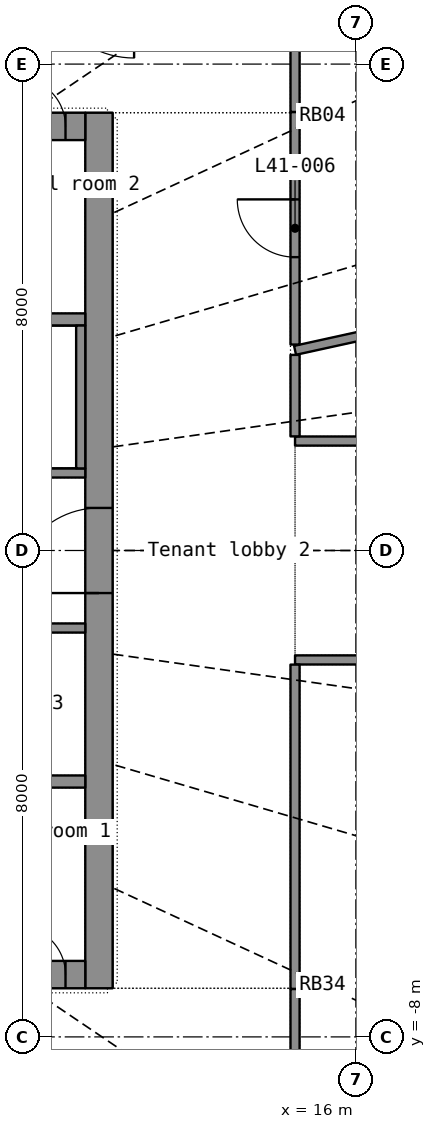
"""IFC4 building model, lengths in metres.
Left out: names, types, materials, properties, quantities, classifications, styles, units other than length and angle.
Written with IfcOpenShell. Run it as: python <this file> out.ifc"""

import sys

from ifc_helpers import new_model, si_unit, direction, frame, frame_2d, origin, place, context, subcontext, project, spatial, rectangle, extrude, element, fill, save


model = new_model("IFC4")
c1 = context("Model", 3, precision=1e-05, world=origin(), true_north=direction((0.0, 1.0)))
c2 = subcontext(c1, "Body", "Model", "MODEL_VIEW")
j1 = project(units=[si_unit("LENGTHUNIT", "METRE"), si_unit("PLANEANGLEUNIT", "RADIAN")], contexts=[c1])
p1 = place(None, origin())
s1 = spatial("IfcSite", under=j1, at=p1, CompositionType="ELEMENT")
p2 = place(p1, origin())
s2 = spatial("IfcBuilding", under=s1, at=p2, CompositionType="ELEMENT")
p3 = place(p2, frame((0.0, 0.0, 171.9)))
s3 = spatial("IfcBuildingStorey", under=s2, at=p3, CompositionType="ELEMENT", Elevation=171.9)
p4 = place(p3, frame((11.775, -7.2, 0.0), z_axis=(0.0, 0.0, 1.0), x_axis=(0.0, 1.0, 0.0)))
e1 = element("IfcWall", 1, at=p4, inside=s3, PredefinedType="SHEAR", context=c2, shape_type="SweptSolid", body=[
    extrude(rectangle(XDim=14.4, YDim=0.45, at=frame_2d((7.2, 0.0))), origin(), (0.0, 0.0, 1.0), 3.3),
])
p5 = place(p4, frame((6.5, 0.0, 0.0)))
e2 = element("IfcOpeningElement", 2, at=p5, cuts=e1, PredefinedType="OPENING", context=c2, shape_type="SweptSolid", body=[
    extrude(rectangle(XDim=1.4, YDim=2.2, at=frame_2d((0.7, 1.1))), frame((0.0, 0.235, 0.0), z_axis=(0.0, -1.0, 0.0), x_axis=(1.0, 0.0, 0.0)), (0.0, 0.0, 1.0), 0.47),
])
p6 = place(p3, frame((-11.55, -6.975, 0.0), z_axis=(0.0, 0.0, 1.0), x_axis=(1.0, 0.0, 0.0)))
e3 = element("IfcWall", 3, at=p6, inside=s3, PredefinedType="SHEAR", context=c2, shape_type="SweptSolid", body=[
    extrude(rectangle(XDim=23.1, YDim=0.45, at=frame_2d((11.55, 0.0))), origin(), (0.0, 0.0, 1.0), 3.3),
])
p7 = place(p6, frame((20.0, 0.0, 0.0)))
e4 = element("IfcOpeningElement", 4, at=p7, cuts=e3, PredefinedType="OPENING", context=c2, shape_type="SweptSolid", body=[
    extrude(rectangle(XDim=1.1, YDim=2.2, at=frame_2d((0.55, 1.1))), frame((0.0, 0.235, 0.0), z_axis=(0.0, -1.0, 0.0), x_axis=(1.0, 0.0, 0.0)), (0.0, 0.0, 1.0), 0.47),
])
p8 = place(p6, frame((4.1, 0.0, 0.0)))
e5 = element("IfcOpeningElement", 5, at=p8, cuts=e3, PredefinedType="OPENING", context=c2, shape_type="SweptSolid", body=[
    extrude(rectangle(XDim=0.9, YDim=2.1, at=frame_2d((0.45, 1.05))), frame((0.0, 0.235, 0.0), z_axis=(0.0, -1.0, 0.0), x_axis=(1.0, 0.0, 0.0)), (0.0, 0.0, 1.0), 0.47),
])
p9 = place(p6, frame((11.1, 0.0, 0.0)))
e6 = element("IfcOpeningElement", 6, at=p9, cuts=e3, PredefinedType="OPENING", context=c2, shape_type="SweptSolid", body=[
    extrude(rectangle(XDim=0.9, YDim=2.1, at=frame_2d((0.45, 1.05))), frame((0.0, 0.235, 0.0), z_axis=(0.0, -1.0, 0.0), x_axis=(1.0, 0.0, 0.0)), (0.0, 0.0, 1.0), 0.47),
])
p10 = place(p6, frame((17.1, 0.0, 0.0)))
e7 = element("IfcOpeningElement", 7, at=p10, cuts=e3, PredefinedType="OPENING", context=c2, shape_type="SweptSolid", body=[
    extrude(rectangle(XDim=0.9, YDim=2.1, at=frame_2d((0.45, 1.05))), frame((0.0, 0.235, 0.0), z_axis=(0.0, -1.0, 0.0), x_axis=(1.0, 0.0, 0.0)), (0.0, 0.0, 1.0), 0.47),
])
p11 = place(p6, frame((0.325, 0.0, 0.0)))
e8 = element("IfcOpeningElement", 8, at=p11, cuts=e3, PredefinedType="OPENING", context=c2, shape_type="SweptSolid", body=[
    extrude(rectangle(XDim=0.8, YDim=2.05, at=frame_2d((0.4, 1.025))), frame((0.0, 0.235, 0.0), z_axis=(0.0, -1.0, 0.0), x_axis=(1.0, 0.0, 0.0)), (0.0, 0.0, 1.0), 0.47),
])
p12 = place(p6, frame((21.975, 0.0, 0.0)))
e9 = element("IfcOpeningElement", 9, at=p12, cuts=e3, PredefinedType="OPENING", context=c2, shape_type="SweptSolid", body=[
    extrude(rectangle(XDim=0.8, YDim=2.05, at=frame_2d((0.4, 1.025))), frame((0.0, 0.235, 0.0), z_axis=(0.0, -1.0, 0.0), x_axis=(1.0, 0.0, 0.0)), (0.0, 0.0, 1.0), 0.47),
])
p13 = place(p3, frame((-11.55, 6.975, 0.0), z_axis=(0.0, 0.0, 1.0), x_axis=(1.0, 0.0, 0.0)))
e10 = element("IfcWall", 10, at=p13, inside=s3, PredefinedType="SHEAR", context=c2, shape_type="SweptSolid", body=[
    extrude(rectangle(XDim=23.1, YDim=0.45, at=frame_2d((11.55, 0.0))), origin(), (0.0, 0.0, 1.0), 3.3),
])
p14 = place(p13, frame((2.0, 0.0, 0.0)))
e11 = element("IfcOpeningElement", 11, at=p14, cuts=e10, PredefinedType="OPENING", context=c2, shape_type="SweptSolid", body=[
    extrude(rectangle(XDim=1.1, YDim=2.2, at=frame_2d((0.55, 1.1))), frame((0.0, 0.235, 0.0), z_axis=(0.0, -1.0, 0.0), x_axis=(1.0, 0.0, 0.0)), (0.0, 0.0, 1.0), 0.47),
])
p15 = place(p13, frame((6.0, 0.0, 0.0)))
e12 = element("IfcOpeningElement", 12, at=p15, cuts=e10, PredefinedType="OPENING", context=c2, shape_type="SweptSolid", body=[
    extrude(rectangle(XDim=1.1, YDim=2.2, at=frame_2d((0.55, 1.1))), frame((0.0, 0.235, 0.0), z_axis=(0.0, -1.0, 0.0), x_axis=(1.0, 0.0, 0.0)), (0.0, 0.0, 1.0), 0.47),
])
p16 = place(p13, frame((8.0, 0.0, 0.0)))
e13 = element("IfcOpeningElement", 13, at=p16, cuts=e10, PredefinedType="OPENING", context=c2, shape_type="SweptSolid", body=[
    extrude(rectangle(XDim=1.1, YDim=2.2, at=frame_2d((0.55, 1.1))), frame((0.0, 0.235, 0.0), z_axis=(0.0, -1.0, 0.0), x_axis=(1.0, 0.0, 0.0)), (0.0, 0.0, 1.0), 0.47),
])
p17 = place(p13, frame((10.0, 0.0, 0.0)))
e14 = element("IfcOpeningElement", 14, at=p17, cuts=e10, PredefinedType="OPENING", context=c2, shape_type="SweptSolid", body=[
    extrude(rectangle(XDim=1.1, YDim=2.2, at=frame_2d((0.55, 1.1))), frame((0.0, 0.235, 0.0), z_axis=(0.0, -1.0, 0.0), x_axis=(1.0, 0.0, 0.0)), (0.0, 0.0, 1.0), 0.47),
])
p18 = place(p13, frame((12.0, 0.0, 0.0)))
e15 = element("IfcOpeningElement", 15, at=p18, cuts=e10, PredefinedType="OPENING", context=c2, shape_type="SweptSolid", body=[
    extrude(rectangle(XDim=1.1, YDim=2.2, at=frame_2d((0.55, 1.1))), frame((0.0, 0.235, 0.0), z_axis=(0.0, -1.0, 0.0), x_axis=(1.0, 0.0, 0.0)), (0.0, 0.0, 1.0), 0.47),
])
p19 = place(p13, frame((14.0, 0.0, 0.0)))
e16 = element("IfcOpeningElement", 16, at=p19, cuts=e10, PredefinedType="OPENING", context=c2, shape_type="SweptSolid", body=[
    extrude(rectangle(XDim=1.1, YDim=2.2, at=frame_2d((0.55, 1.1))), frame((0.0, 0.235, 0.0), z_axis=(0.0, -1.0, 0.0), x_axis=(1.0, 0.0, 0.0)), (0.0, 0.0, 1.0), 0.47),
])
p20 = place(p13, frame((16.0, 0.0, 0.0)))
e17 = element("IfcOpeningElement", 17, at=p20, cuts=e10, PredefinedType="OPENING", context=c2, shape_type="SweptSolid", body=[
    extrude(rectangle(XDim=1.1, YDim=2.2, at=frame_2d((0.55, 1.1))), frame((0.0, 0.235, 0.0), z_axis=(0.0, -1.0, 0.0), x_axis=(1.0, 0.0, 0.0)), (0.0, 0.0, 1.0), 0.47),
])
p21 = place(p13, frame((18.0, 0.0, 0.0)))
e18 = element("IfcOpeningElement", 18, at=p21, cuts=e10, PredefinedType="OPENING", context=c2, shape_type="SweptSolid", body=[
    extrude(rectangle(XDim=1.1, YDim=2.2, at=frame_2d((0.55, 1.1))), frame((0.0, 0.235, 0.0), z_axis=(0.0, -1.0, 0.0), x_axis=(1.0, 0.0, 0.0)), (0.0, 0.0, 1.0), 0.47),
])
p22 = place(p13, frame((20.0, 0.0, 0.0)))
e19 = element("IfcOpeningElement", 19, at=p22, cuts=e10, PredefinedType="OPENING", context=c2, shape_type="SweptSolid", body=[
    extrude(rectangle(XDim=1.1, YDim=2.2, at=frame_2d((0.55, 1.1))), frame((0.0, 0.235, 0.0), z_axis=(0.0, -1.0, 0.0), x_axis=(1.0, 0.0, 0.0)), (0.0, 0.0, 1.0), 0.47),
])
p23 = place(p13, frame((4.1, 0.0, 0.0)))
e20 = element("IfcOpeningElement", 20, at=p23, cuts=e10, PredefinedType="OPENING", context=c2, shape_type="SweptSolid", body=[
    extrude(rectangle(XDim=0.9, YDim=2.1, at=frame_2d((0.45, 1.05))), frame((0.0, 0.235, 0.0), z_axis=(0.0, -1.0, 0.0), x_axis=(1.0, 0.0, 0.0)), (0.0, 0.0, 1.0), 0.47),
])
p24 = place(p13, frame((0.325, 0.0, 0.0)))
e21 = element("IfcOpeningElement", 21, at=p24, cuts=e10, PredefinedType="OPENING", context=c2, shape_type="SweptSolid", body=[
    extrude(rectangle(XDim=0.8, YDim=2.05, at=frame_2d((0.4, 1.025))), frame((0.0, 0.235, 0.0), z_axis=(0.0, -1.0, 0.0), x_axis=(1.0, 0.0, 0.0)), (0.0, 0.0, 1.0), 0.47),
])
p25 = place(p13, frame((21.975, 0.0, 0.0)))
e22 = element("IfcOpeningElement", 22, at=p25, cuts=e10, PredefinedType="OPENING", context=c2, shape_type="SweptSolid", body=[
    extrude(rectangle(XDim=0.8, YDim=2.05, at=frame_2d((0.4, 1.025))), frame((0.0, 0.235, 0.0), z_axis=(0.0, -1.0, 0.0), x_axis=(1.0, 0.0, 0.0)), (0.0, 0.0, 1.0), 0.47),
])
for number, where, z_axis, x_axis in (
    (23, (-11.55, -3.8, 0.0), (0.0, 0.0, 1.0), (1.0, 0.0, 0.0)),
    (24, (-11.55, 3.8, 0.0), (0.0, 0.0, 1.0), (1.0, 0.0, 0.0)),
):
    element("IfcWall", number, at=place(p3, frame(where, z_axis=z_axis, x_axis=x_axis)), inside=s3, PredefinedType="SHEAR", context=c2, shape_type="SweptSolid", body=[
        extrude(rectangle(XDim=23.1, YDim=0.2, at=frame_2d((11.55, 0.0))), origin(), (0.0, 0.0, 1.0), 3.3),
    ])
p26 = place(p3, frame((3.0, -1.275, 0.0), z_axis=(0.0, 0.0, 1.0), x_axis=(1.0, 0.0, 0.0)))
e25 = element("IfcWall", 25, at=p26, inside=s3, PredefinedType="PARTITIONING", context=c2, shape_type="SweptSolid", body=[
    extrude(rectangle(XDim=8.55, YDim=0.15, at=frame_2d((4.275, 0.0))), origin(), (0.0, 0.0, 1.0), 3.3),
])
p27 = place(p26, frame((0.812, 0.0, 0.0)))
e26 = element("IfcOpeningElement", 26, at=p27, cuts=e25, PredefinedType="OPENING", context=c2, shape_type="SweptSolid", body=[
    extrude(rectangle(XDim=0.85, YDim=2.1, at=frame_2d((0.425, 1.05))), frame((0.0, 0.085, 0.0), z_axis=(0.0, -1.0, 0.0), x_axis=(1.0, 0.0, 0.0)), (0.0, 0.0, 1.0), 0.17),
])
p28 = place(p26, frame((3.083, 0.0, 0.0)))
e27 = element("IfcOpeningElement", 27, at=p28, cuts=e25, PredefinedType="OPENING", context=c2, shape_type="SweptSolid", body=[
    extrude(rectangle(XDim=0.9, YDim=2.1, at=frame_2d((0.45, 1.05))), frame((0.0, 0.085, 0.0), z_axis=(0.0, -1.0, 0.0), x_axis=(1.0, 0.0, 0.0)), (0.0, 0.0, 1.0), 0.17),
])
p29 = place(p26, frame((6.12, 0.0, 0.0)))
e28 = element("IfcOpeningElement", 28, at=p29, cuts=e25, PredefinedType="OPENING", context=c2, shape_type="SweptSolid", body=[
    extrude(rectangle(XDim=0.9, YDim=2.1, at=frame_2d((0.45, 1.05))), frame((0.0, 0.085, 0.0), z_axis=(0.0, -1.0, 0.0), x_axis=(1.0, 0.0, 0.0)), (0.0, 0.0, 1.0), 0.17),
])
p30 = place(p3, frame((3.0, 1.275, 0.0), z_axis=(0.0, 0.0, 1.0), x_axis=(1.0, 0.0, 0.0)))
e29 = element("IfcWall", 29, at=p30, inside=s3, PredefinedType="SHEAR", context=c2, shape_type="SweptSolid", body=[
    extrude(rectangle(XDim=8.55, YDim=0.15, at=frame_2d((4.275, 0.0))), origin(), (0.0, 0.0, 1.0), 3.3),
])
p31 = place(p30, frame((2.05, 0.0, 0.0)))
e30 = element("IfcOpeningElement", 30, at=p31, cuts=e29, PredefinedType="OPENING", context=c2, shape_type="SweptSolid", body=[
    extrude(rectangle(XDim=1.1, YDim=2.15, at=frame_2d((0.55, 1.075))), frame((0.0, 0.085, 0.0), z_axis=(0.0, -1.0, 0.0), x_axis=(1.0, 0.0, 0.0)), (0.0, 0.0, 1.0), 0.17),
])
p32 = place(p30, frame((0.45, 0.0, 0.0)))
e31 = element("IfcOpeningElement", 31, at=p32, cuts=e29, PredefinedType="OPENING", context=c2, shape_type="SweptSolid", body=[
    extrude(rectangle(XDim=0.9, YDim=2.1, at=frame_2d((0.45, 1.05))), frame((0.0, 0.085, 0.0), z_axis=(0.0, -1.0, 0.0), x_axis=(1.0, 0.0, 0.0)), (0.0, 0.0, 1.0), 0.17),
])
p33 = place(p3, frame((11.475, 1.35, 0.0), z_axis=(0.0, 0.0, 1.0), x_axis=(0.0, 1.0, 0.0)))
e32 = element("IfcWall", 32, at=p33, inside=s3, PredefinedType="SHEAR", context=c2, shape_type="SweptSolid", body=[
    extrude(rectangle(XDim=2.35, YDim=0.15, at=frame_2d((1.175, 0.0))), origin(), (0.0, 0.0, 1.0), 3.3),
])
p34 = place(p3, frame((22.608, 4.962, 0.0), z_axis=(0.0, 0.0, 1.0), x_axis=(-0.976750106, -0.21438104, 0.0)))
e33 = element("IfcWall", 33, at=p34, inside=s3, PredefinedType="PARTITIONING", context=c2, shape_type="SweptSolid", body=[
    extrude(rectangle(XDim=7.79, YDim=0.15, at=frame_2d((3.895, 0.0))), origin(), (0.0, 0.0, 1.0), 2.4),
])
p35 = place(p3, frame((15.0, -1.8, 0.0), z_axis=(0.0, 0.0, 1.0), x_axis=(1.0, 0.0, 0.0)))
e34 = element("IfcWall", 34, at=p35, inside=s3, PredefinedType="PARTITIONING", context=c2, shape_type="SweptSolid", body=[
    extrude(rectangle(XDim=5.766, YDim=0.15, at=frame_2d((2.883, 0.0))), origin(), (0.0, 0.0, 1.0), 2.4),
])
p36 = place(p35, frame((2.283, 0.0, 0.0)))
e35 = element("IfcOpeningElement", 35, at=p36, cuts=e34, PredefinedType="OPENING", context=c2, shape_type="SweptSolid", body=[
    extrude(rectangle(XDim=1.2, YDim=2.2, at=frame_2d((0.6, 1.1))), frame((0.0, 0.085, 0.0), z_axis=(0.0, -1.0, 0.0), x_axis=(1.0, 0.0, 0.0)), (0.0, 0.0, 1.0), 0.17),
])
p37 = place(p3, frame((20.766, 1.8, 0.0), z_axis=(0.0, 0.0, 1.0), x_axis=(-1.0, 0.0, 0.0)))
e36 = element("IfcWall", 36, at=p37, inside=s3, PredefinedType="PARTITIONING", context=c2, shape_type="SweptSolid", body=[
    extrude(rectangle(XDim=5.766, YDim=0.15, at=frame_2d((2.883, 0.0))), origin(), (0.0, 0.0, 1.0), 2.4),
])
p38 = place(p37, frame((2.283, 0.0, 0.0)))
e37 = element("IfcOpeningElement", 37, at=p38, cuts=e36, PredefinedType="OPENING", context=c2, shape_type="SweptSolid", body=[
    extrude(rectangle(XDim=1.2, YDim=2.2, at=frame_2d((0.6, 1.1))), frame((0.0, 0.085, 0.0), z_axis=(0.0, -1.0, 0.0), x_axis=(1.0, 0.0, 0.0)), (0.0, 0.0, 1.0), 0.17),
])
p39 = place(p3, frame((15.0, -7.212, 0.0), z_axis=(0.0, 0.0, 1.0), x_axis=(0.0, 1.0, 0.0)))
e38 = element("IfcWall", 38, at=p39, inside=s3, PredefinedType="PARTITIONING", context=c2, shape_type="SweptSolid", body=[
    extrude(rectangle(XDim=5.335, YDim=0.15, at=frame_2d((2.667, 0.0))), origin(), (0.0, 0.0, 1.0), 2.4),
])
p40 = place(p3, frame((15.0, 3.387, 0.0), z_axis=(0.0, 0.0, 1.0), x_axis=(0.0, 1.0, 0.0)))
e39 = element("IfcWall", 39, at=p40, inside=s3, PredefinedType="PARTITIONING", context=c2, shape_type="SweptSolid", body=[
    extrude(rectangle(XDim=3.824, YDim=0.15, at=frame_2d((1.912, 0.0))), origin(), (0.0, 0.0, 1.0), 2.4),
])
p41 = place(p40, frame((1.437, 0.0, 0.0)))
e40 = element("IfcOpeningElement", 40, at=p41, cuts=e39, PredefinedType="OPENING", context=c2, shape_type="SweptSolid", body=[
    extrude(rectangle(XDim=0.95, YDim=2.15, at=frame_2d((0.475, 1.075))), frame((0.0, 0.085, 0.0), z_axis=(0.0, -1.0, 0.0), x_axis=(1.0, 0.0, 0.0)), (0.0, 0.0, 1.0), 0.17),
])
p42 = place(p3, frame((15.0, -9.523, 0.0), z_axis=(0.0, 0.0, 1.0), x_axis=(0.0, 1.0, 0.0)))
e41 = element("IfcWall", 41, at=p42, inside=s3, PredefinedType="PARTITIONING", context=c2, shape_type="SweptSolid", body=[
    extrude(rectangle(XDim=2.31, YDim=0.15, at=frame_2d((1.155, 0.0))), origin(), (0.0, 0.0, 1.0), 2.4),
])
p43 = place(p3, frame((15.0, 1.877, 0.0), z_axis=(0.0, 0.0, 1.0), x_axis=(0.0, 1.0, 0.0)))
e42 = element("IfcWall", 42, at=p43, inside=s3, PredefinedType="PARTITIONING", context=c2, shape_type="SweptSolid", body=[
    extrude(rectangle(XDim=1.34, YDim=0.15, at=frame_2d((0.67, 0.0))), origin(), (0.0, 0.0, 1.0), 2.4),
])
p44 = place(p3, frame((15.0, 7.213, 0.0), z_axis=(0.0, 0.0, 1.0), x_axis=(0.0, 1.0, 0.0)))
e43 = element("IfcWall", 43, at=p44, inside=s3, PredefinedType="PARTITIONING", context=c2, shape_type="SweptSolid", body=[
    extrude(rectangle(XDim=1.323, YDim=0.15, at=frame_2d((0.662, 0.0))), origin(), (0.0, 0.0, 1.0), 2.4),
])
p45 = place(p12, origin())
e44 = element("IfcDoor", 44, at=p45, inside=s3, OperationType="SINGLE_SWING_LEFT", PredefinedType="DOOR", context=c2, shape_type="SweptSolid", body=[
    extrude(rectangle(XDim=0.8, YDim=2.05, at=frame_2d((0.4, 1.025))), frame((0.0, 0.025, 0.0), z_axis=(0.0, -1.0, 0.0), x_axis=(1.0, 0.0, 0.0)), (0.0, 0.0, 1.0), 0.05),
])
fill(e9, e44)
p46 = place(p25, origin())
e45 = element("IfcDoor", 45, at=p46, inside=s3, OperationType="SINGLE_SWING_LEFT", PredefinedType="DOOR", context=c2, shape_type="SweptSolid", body=[
    extrude(rectangle(XDim=0.8, YDim=2.05, at=frame_2d((0.4, 1.025))), frame((0.0, 0.025, 0.0), z_axis=(0.0, -1.0, 0.0), x_axis=(1.0, 0.0, 0.0)), (0.0, 0.0, 1.0), 0.05),
])
fill(e22, e45)
p47 = place(p5, origin())
e46 = element("IfcDoor", 46, at=p47, inside=s3, OperationType="DOUBLE_DOOR_SINGLE_SWING", PredefinedType="DOOR", context=c2, shape_type="SweptSolid", body=[
    extrude(rectangle(XDim=1.4, YDim=2.2, at=frame_2d((0.7, 1.1))), frame((0.0, 0.025, 0.0), z_axis=(0.0, -1.0, 0.0), x_axis=(1.0, 0.0, 0.0)), (0.0, 0.0, 1.0), 0.05),
])
fill(e2, e46)
p48 = place(p41, origin())
e47 = element("IfcDoor", 47, at=p48, inside=s3, OperationType="SINGLE_SWING_RIGHT", PredefinedType="DOOR", context=c2, shape_type="SweptSolid", body=[
    extrude(rectangle(XDim=0.95, YDim=2.15, at=frame_2d((0.475, 1.075))), frame((0.0, 0.025, 0.0), z_axis=(0.0, -1.0, 0.0), x_axis=(1.0, 0.0, 0.0)), (0.0, 0.0, 1.0), 0.05),
])
fill(e40, e47)
save(model, sys.argv[1])
